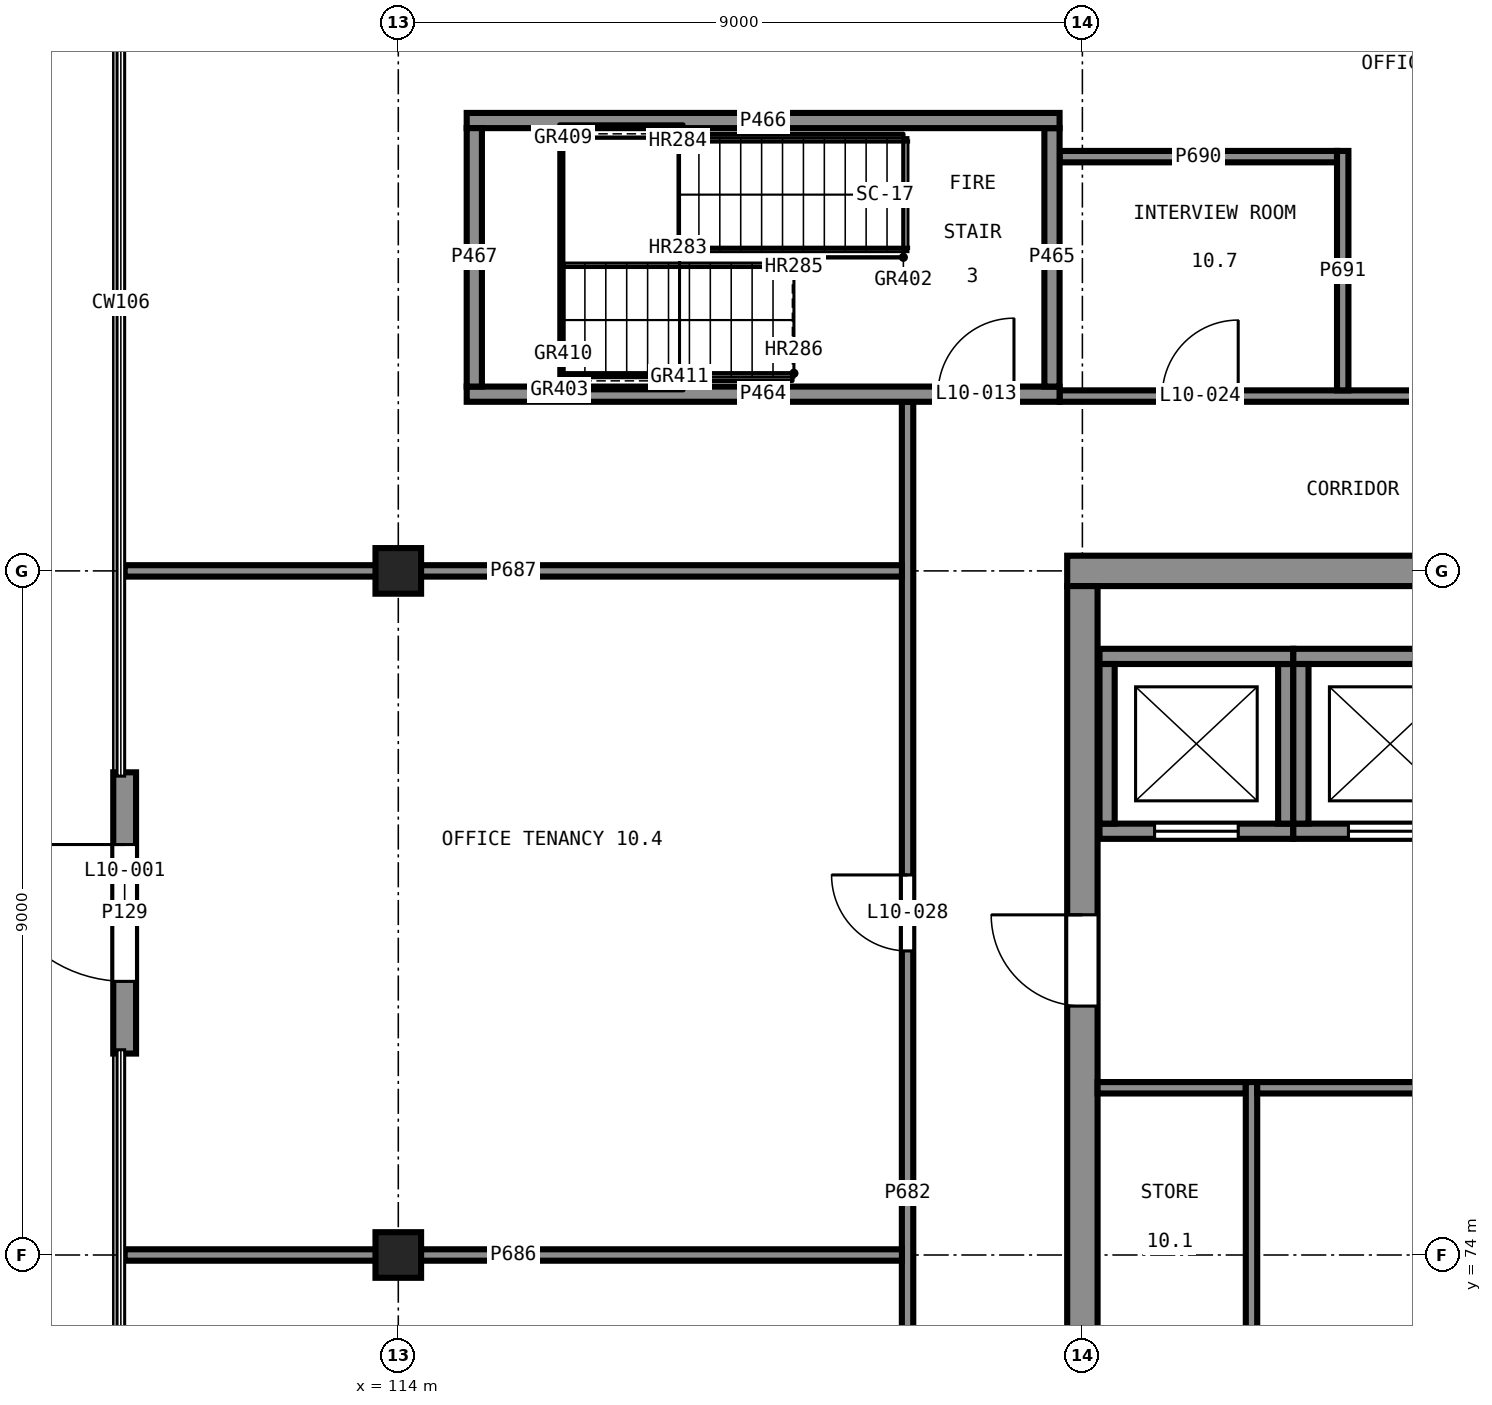
"""IFC4 building model, lengths in metres.
Left out: names, types, materials, properties, quantities, classifications, styles, units other than length and angle.
Written with IfcOpenShell. Run it as: python <this file> out.ifc"""

import sys

from ifc_helpers import new_model, si_unit, direction, frame, frame_2d, origin, origin_2d, place, context, subcontext, project, spatial, rectangle, extrude, element, fill, save


model = new_model("IFC4")
c1 = context("Model", 3, precision=1e-05, world=origin(), true_north=direction((0.0, 1.0)))
c2 = subcontext(c1, "Body", "Model", "MODEL_VIEW")
j1 = project(units=[si_unit("LENGTHUNIT", "METRE"), si_unit("PLANEANGLEUNIT", "RADIAN")], contexts=[c1])
p1 = place(None, origin())
s1 = spatial("IfcSite", under=j1, at=p1, CompositionType="ELEMENT")
p2 = place(p1, origin())
s2 = spatial("IfcBuilding", under=s1, at=p2, CompositionType="ELEMENT")
p3 = place(p2, frame((0.0, 0.0, 41.5)))
s3 = spatial("IfcBuildingStorey", under=s2, at=p3, CompositionType="ELEMENT", Elevation=41.5)
for number, where, z_axis, x_axis in (
    (1, (114.0, 74.0, 0.0), (0.0, 0.0, 1.0), (1.0, 0.0, 0.0)),
    (2, (114.0, 83.0, 0.0), (0.0, 0.0, 1.0), (1.0, 0.0, 0.0)),
):
    element("IfcColumn", number, at=place(p3, frame(where, z_axis=z_axis, x_axis=x_axis)), inside=s3, PredefinedType="COLUMN", context=c2, shape_type="SweptSolid", body=[
        extrude(rectangle(XDim=0.6, YDim=0.6, at=origin_2d()), origin(), (0.0, 0.0, 1.0), 4.0),
    ])
p4 = place(p3, frame((141.2, 83.0, 0.0), z_axis=(0.0, 0.0, 1.0), x_axis=(-1.0, 0.0, 0.0)))
e3 = element("IfcWall", 3, at=p4, inside=s3, PredefinedType="SHEAR", context=c2, shape_type="SweptSolid", body=[
    extrude(rectangle(XDim=18.4, YDim=0.4, at=frame_2d((9.2, 0.0))), origin(), (0.0, 0.0, 1.0), 4.0),
])
p5 = place(p3, frame((123.0, 82.8, 0.0), z_axis=(0.0, 0.0, 1.0), x_axis=(0.0, -1.0, 0.0)))
e4 = element("IfcWall", 4, at=p5, inside=s3, PredefinedType="SHEAR", context=c2, shape_type="SweptSolid", body=[
    extrude(rectangle(XDim=17.6, YDim=0.4, at=frame_2d((8.8, 0.0))), origin(), (0.0, 0.0, 1.0), 4.0),
])
p6 = place(p5, frame((12.075, 0.0, 0.0)))
e5 = element("IfcOpeningElement", 5, at=p6, cuts=e4, PredefinedType="OPENING", context=c2, shape_type="SweptSolid", body=[
    extrude(rectangle(XDim=1.2, YDim=2.1, at=frame_2d((0.6, 1.05))), frame((0.0, 0.21, 0.0), z_axis=(0.0, -1.0, 0.0), x_axis=(1.0, 0.0, 0.0)), (0.0, 0.0, 1.0), 0.42),
])
p7 = place(p5, frame((4.325, 0.0, 0.0)))
e6 = element("IfcOpeningElement", 6, at=p7, cuts=e4, PredefinedType="OPENING", context=c2, shape_type="SweptSolid", body=[
    extrude(rectangle(XDim=1.2, YDim=2.1, at=frame_2d((0.6, 1.05))), frame((0.0, 0.21, 0.0), z_axis=(0.0, -1.0, 0.0), x_axis=(1.0, 0.0, 0.0)), (0.0, 0.0, 1.0), 0.42),
])
p8 = place(p3, frame((110.4, 80.35, 0.0), z_axis=(0.0, 0.0, 1.0), x_axis=(0.0, -1.0, 0.0)))
e7 = element("IfcWall", 7, at=p8, inside=s3, PredefinedType="SOLIDWALL", context=c2, shape_type="SweptSolid", body=[
    extrude(rectangle(XDim=3.7, YDim=0.3, at=frame_2d((1.85, 0.0))), origin(), (0.0, 0.0, 1.0), 3.75),
])
p9 = place(p8, frame((0.95, 0.0, 0.0)))
e8 = element("IfcOpeningElement", 8, at=p9, cuts=e7, PredefinedType="OPENING", context=c2, shape_type="SweptSolid", body=[
    extrude(rectangle(XDim=1.8, YDim=2.4, at=frame_2d((0.9, 1.2))), frame((0.0, 0.16, 0.0), z_axis=(0.0, -1.0, 0.0), x_axis=(1.0, 0.0, 0.0)), (0.0, 0.0, 1.0), 0.32),
])
p10 = place(p3, frame((123.225, 79.575, 0.0), z_axis=(0.0, 0.0, 1.0), x_axis=(1.0, 0.0, 0.0)))
e9 = element("IfcWall", 9, at=p10, inside=s3, PredefinedType="SHEAR", context=c2, shape_type="SweptSolid", body=[
    extrude(rectangle(XDim=2.55, YDim=0.2, at=frame_2d((1.275, 0.0))), origin(), (0.0, 0.0, 1.0), 4.0),
])
p11 = place(p10, frame((0.725, 0.0, 0.0)))
e10 = element("IfcOpeningElement", 10, at=p11, cuts=e9, PredefinedType="OPENING", context=c2, shape_type="SweptSolid", body=[
    extrude(rectangle(XDim=1.1, YDim=2.1, at=frame_2d((0.55, 1.05))), frame((0.0, 0.11, 0.0), z_axis=(0.0, -1.0, 0.0), x_axis=(1.0, 0.0, 0.0)), (0.0, 0.0, 1.0), 0.22),
])
p12 = place(p3, frame((125.675, 79.675, 0.0), z_axis=(0.0, 0.0, 1.0), x_axis=(0.0, 1.0, 0.0)))
e11 = element("IfcWall", 11, at=p12, inside=s3, PredefinedType="SHEAR", context=c2, shape_type="SweptSolid", body=[
    extrude(rectangle(XDim=2.1, YDim=0.2, at=frame_2d((1.05, 0.0))), origin(), (0.0, 0.0, 1.0), 4.0),
])
p13 = place(p3, frame((125.775, 81.875, 0.0), z_axis=(0.0, 0.0, 1.0), x_axis=(-1.0, 0.0, 0.0)))
e12 = element("IfcWall", 12, at=p13, inside=s3, PredefinedType="SHEAR", context=c2, shape_type="SweptSolid", body=[
    extrude(rectangle(XDim=2.55, YDim=0.2, at=frame_2d((1.275, 0.0))), origin(), (0.0, 0.0, 1.0), 4.0),
])
p14 = place(p3, frame((123.325, 81.775, 0.0), z_axis=(0.0, 0.0, 1.0), x_axis=(0.0, -1.0, 0.0)))
e13 = element("IfcWall", 13, at=p14, inside=s3, PredefinedType="SHEAR", context=c2, shape_type="SweptSolid", body=[
    extrude(rectangle(XDim=2.1, YDim=0.2, at=frame_2d((1.05, 0.0))), origin(), (0.0, 0.0, 1.0), 4.0),
])
p15 = place(p3, frame((125.775, 79.575, 0.0), z_axis=(0.0, 0.0, 1.0), x_axis=(1.0, 0.0, 0.0)))
e14 = element("IfcWall", 14, at=p15, inside=s3, PredefinedType="SHEAR", context=c2, shape_type="SweptSolid", body=[
    extrude(rectangle(XDim=2.55, YDim=0.2, at=frame_2d((1.275, 0.0))), origin(), (0.0, 0.0, 1.0), 4.0),
])
p16 = place(p15, frame((0.725, 0.0, 0.0)))
e15 = element("IfcOpeningElement", 15, at=p16, cuts=e14, PredefinedType="OPENING", context=c2, shape_type="SweptSolid", body=[
    extrude(rectangle(XDim=1.1, YDim=2.1, at=frame_2d((0.55, 1.05))), frame((0.0, 0.11, 0.0), z_axis=(0.0, -1.0, 0.0), x_axis=(1.0, 0.0, 0.0)), (0.0, 0.0, 1.0), 0.22),
])
p17 = place(p3, frame((128.325, 81.875, 0.0), z_axis=(0.0, 0.0, 1.0), x_axis=(-1.0, 0.0, 0.0)))
e16 = element("IfcWall", 16, at=p17, inside=s3, PredefinedType="SHEAR", context=c2, shape_type="SweptSolid", body=[
    extrude(rectangle(XDim=2.55, YDim=0.2, at=frame_2d((1.275, 0.0))), origin(), (0.0, 0.0, 1.0), 4.0),
])
p18 = place(p3, frame((125.875, 81.775, 0.0), z_axis=(0.0, 0.0, 1.0), x_axis=(0.0, -1.0, 0.0)))
e17 = element("IfcWall", 17, at=p18, inside=s3, PredefinedType="SHEAR", context=c2, shape_type="SweptSolid", body=[
    extrude(rectangle(XDim=2.1, YDim=0.2, at=frame_2d((1.05, 0.0))), origin(), (0.0, 0.0, 1.0), 4.0),
])
p19 = place(p3, frame((114.9, 85.325, 0.0), z_axis=(0.0, 0.0, 1.0), x_axis=(1.0, 0.0, 0.0)))
e18 = element("IfcWall", 18, at=p19, inside=s3, PredefinedType="SHEAR", context=c2, shape_type="SweptSolid", body=[
    extrude(rectangle(XDim=7.8, YDim=0.2, at=frame_2d((3.9, 0.0))), origin(), (0.0, 0.0, 1.0), 3.75),
])
p20 = place(p19, frame((6.2, 0.0, 0.0)))
e19 = element("IfcOpeningElement", 19, at=p20, cuts=e18, PredefinedType="OPENING", context=c2, shape_type="SweptSolid", body=[
    extrude(rectangle(XDim=1.0, YDim=2.1, at=frame_2d((0.5, 1.05))), frame((0.0, 0.11, 0.0), z_axis=(0.0, -1.0, 0.0), x_axis=(1.0, 0.0, 0.0)), (0.0, 0.0, 1.0), 0.22),
])
p21 = place(p3, frame((122.6, 85.425, 0.0), z_axis=(0.0, 0.0, 1.0), x_axis=(0.0, 1.0, 0.0)))
e20 = element("IfcWall", 20, at=p21, inside=s3, PredefinedType="SHEAR", context=c2, shape_type="SweptSolid", body=[
    extrude(rectangle(XDim=3.4, YDim=0.2, at=frame_2d((1.7, 0.0))), origin(), (0.0, 0.0, 1.0), 3.75),
])
p22 = place(p3, frame((122.7, 88.925, 0.0), z_axis=(0.0, 0.0, 1.0), x_axis=(-1.0, 0.0, 0.0)))
e21 = element("IfcWall", 21, at=p22, inside=s3, PredefinedType="SHEAR", context=c2, shape_type="SweptSolid", body=[
    extrude(rectangle(XDim=7.8, YDim=0.2, at=frame_2d((3.9, 0.0))), origin(), (0.0, 0.0, 1.0), 3.75),
])
p23 = place(p3, frame((115.0, 88.825, 0.0), z_axis=(0.0, 0.0, 1.0), x_axis=(0.0, -1.0, 0.0)))
e22 = element("IfcWall", 22, at=p23, inside=s3, PredefinedType="SHEAR", context=c2, shape_type="SweptSolid", body=[
    extrude(rectangle(XDim=3.4, YDim=0.2, at=frame_2d((1.7, 0.0))), origin(), (0.0, 0.0, 1.0), 3.75),
])
p24 = place(p3, frame((125.225, 71.725, 0.0), z_axis=(0.0, 0.0, 1.0), x_axis=(0.0, 1.0, 0.0)))
e23 = element("IfcWall", 23, at=p24, inside=s3, PredefinedType="PARTITIONING", context=c2, shape_type="SweptSolid", body=[
    extrude(rectangle(XDim=4.55, YDim=0.15, at=frame_2d((2.275, 0.0))), origin(), (0.0, 0.0, 1.0), 3.75),
])
p25 = place(p3, frame((123.2, 76.2, 0.0), z_axis=(0.0, 0.0, 1.0), x_axis=(1.0, 0.0, 0.0)))
e24 = element("IfcWall", 24, at=p25, inside=s3, PredefinedType="PARTITIONING", context=c2, shape_type="SweptSolid", body=[
    extrude(rectangle(XDim=1.95, YDim=0.15, at=frame_2d((0.975, 0.0))), origin(), (0.0, 0.0, 1.0), 3.75),
])
p26 = place(p3, frame((125.3, 76.2, 0.0), z_axis=(0.0, 0.0, 1.0), x_axis=(1.0, 0.0, 0.0)))
e25 = element("IfcWall", 25, at=p26, inside=s3, PredefinedType="PARTITIONING", context=c2, shape_type="SweptSolid", body=[
    extrude(rectangle(XDim=5.35, YDim=0.15, at=frame_2d((2.675, 0.0))), origin(), (0.0, 0.0, 1.0), 3.75),
])
p27 = place(p26, frame((2.225, 0.0, 0.0)))
e26 = element("IfcOpeningElement", 26, at=p27, cuts=e25, PredefinedType="OPENING", context=c2, shape_type="SweptSolid", body=[
    extrude(rectangle(XDim=0.9, YDim=2.1, at=frame_2d((0.45, 1.05))), frame((0.0, 0.085, 0.0), z_axis=(0.0, -1.0, 0.0), x_axis=(1.0, 0.0, 0.0)), (0.0, 0.0, 1.0), 0.17),
])
p28 = place(p3, frame((120.7, 64.4, 0.0), z_axis=(0.0, 0.0, 1.0), x_axis=(0.0, 1.0, 0.0)))
e27 = element("IfcWall", 27, at=p28, inside=s3, PredefinedType="PARTITIONING", context=c2, shape_type="SweptSolid", body=[
    extrude(rectangle(XDim=20.825, YDim=0.15, at=frame_2d((10.413, 0.0))), origin(), (0.0, 0.0, 1.0), 3.75),
])
p29 = place(p28, frame((4.413, 0.0, 0.0)))
e28 = element("IfcOpeningElement", 28, at=p29, cuts=e27, PredefinedType="OPENING", context=c2, shape_type="SweptSolid", body=[
    extrude(rectangle(XDim=1.0, YDim=2.1, at=frame_2d((0.5, 1.05))), frame((0.0, 0.085, 0.0), z_axis=(0.0, -1.0, 0.0), x_axis=(1.0, 0.0, 0.0)), (0.0, 0.0, 1.0), 0.17),
])
p30 = place(p28, frame((13.6, 0.0, 0.0)))
e29 = element("IfcOpeningElement", 29, at=p30, cuts=e27, PredefinedType="OPENING", context=c2, shape_type="SweptSolid", body=[
    extrude(rectangle(XDim=1.0, YDim=2.1, at=frame_2d((0.5, 1.05))), frame((0.0, 0.085, 0.0), z_axis=(0.0, -1.0, 0.0), x_axis=(1.0, 0.0, 0.0)), (0.0, 0.0, 1.0), 0.17),
])
p31 = place(p3, frame((122.7, 85.3, 0.0), z_axis=(0.0, 0.0, 1.0), x_axis=(1.0, 0.0, 0.0)))
e30 = element("IfcWall", 30, at=p31, inside=s3, PredefinedType="PARTITIONING", context=c2, shape_type="SweptSolid", body=[
    extrude(rectangle(XDim=9.9, YDim=0.15, at=frame_2d((4.95, 0.0))), origin(), (0.0, 0.0, 1.0), 3.75),
])
p32 = place(p31, frame((1.35, 0.0, 0.0)))
e31 = element("IfcOpeningElement", 31, at=p32, cuts=e30, PredefinedType="OPENING", context=c2, shape_type="SweptSolid", body=[
    extrude(rectangle(XDim=1.0, YDim=2.1, at=frame_2d((0.5, 1.05))), frame((0.0, 0.085, 0.0), z_axis=(0.0, -1.0, 0.0), x_axis=(1.0, 0.0, 0.0)), (0.0, 0.0, 1.0), 0.17),
])
p33 = place(p31, frame((6.335, 0.0, 0.0)))
e32 = element("IfcOpeningElement", 32, at=p33, cuts=e30, PredefinedType="OPENING", context=c2, shape_type="SweptSolid", body=[
    extrude(rectangle(XDim=1.0, YDim=2.1, at=frame_2d((0.5, 1.05))), frame((0.0, 0.085, 0.0), z_axis=(0.0, -1.0, 0.0), x_axis=(1.0, 0.0, 0.0)), (0.0, 0.0, 1.0), 0.17),
])
for number, where, z_axis, x_axis in (
    (33, (110.4, 74.0, 0.0), (0.0, 0.0, 1.0), (1.0, 0.0, 0.0)),
    (34, (110.4, 83.0, 0.0), (0.0, 0.0, 1.0), (1.0, 0.0, 0.0)),
):
    element("IfcWall", number, at=place(p3, frame(where, z_axis=z_axis, x_axis=x_axis)), inside=s3, PredefinedType="PARTITIONING", context=c2, shape_type="SweptSolid", body=[
        extrude(rectangle(XDim=10.226, YDim=0.15, at=frame_2d((5.113, 0.0))), origin(), (0.0, 0.0, 1.0), 2.85),
    ])
p34 = place(p3, frame((122.7, 88.45, 0.0), z_axis=(0.0, 0.0, 1.0), x_axis=(1.0, 0.0, 0.0)))
e35 = element("IfcWall", 35, at=p34, inside=s3, PredefinedType="PARTITIONING", context=c2, shape_type="SweptSolid", body=[
    extrude(rectangle(XDim=3.65, YDim=0.15, at=frame_2d((1.825, 0.0))), origin(), (0.0, 0.0, 1.0), 3.75),
])
p35 = place(p3, frame((126.425, 85.375, 0.0), z_axis=(0.0, 0.0, 1.0), x_axis=(0.0, 1.0, 0.0)))
e36 = element("IfcWall", 36, at=p35, inside=s3, PredefinedType="PARTITIONING", context=c2, shape_type="SweptSolid", body=[
    extrude(rectangle(XDim=3.15, YDim=0.15, at=frame_2d((1.575, 0.0))), origin(), (0.0, 0.0, 1.0), 3.75),
])
p36 = place(p9, frame((1.8, 0.0, 0.0), z_axis=(0.0, 0.0, 1.0), x_axis=(-1.0, 0.0, 0.0)))
e37 = element("IfcDoor", 37, at=p36, inside=s3, OperationType="DOUBLE_DOOR_SINGLE_SWING", PredefinedType="DOOR", context=c2, shape_type="SweptSolid", body=[
    extrude(rectangle(XDim=1.8, YDim=2.4, at=frame_2d((0.9, 1.2))), frame((0.0, 0.025, 0.0), z_axis=(0.0, -1.0, 0.0), x_axis=(1.0, 0.0, 0.0)), (0.0, 0.0, 1.0), 0.05),
])
fill(e8, e37)
p37 = place(p11, origin())
e38 = element("IfcDoor", 38, at=p37, inside=s3, OperationType="SLIDING_TO_LEFT", PredefinedType="DOOR", context=c2, shape_type="SweptSolid", body=[
    extrude(rectangle(XDim=1.1, YDim=2.1, at=frame_2d((0.55, 1.05))), frame((0.0, 0.025, 0.0), z_axis=(0.0, -1.0, 0.0), x_axis=(1.0, 0.0, 0.0)), (0.0, 0.0, 1.0), 0.05),
])
fill(e10, e38)
p38 = place(p16, origin())
e39 = element("IfcDoor", 39, at=p38, inside=s3, OperationType="SLIDING_TO_LEFT", PredefinedType="DOOR", context=c2, shape_type="SweptSolid", body=[
    extrude(rectangle(XDim=1.1, YDim=2.1, at=frame_2d((0.55, 1.05))), frame((0.0, 0.025, 0.0), z_axis=(0.0, -1.0, 0.0), x_axis=(1.0, 0.0, 0.0)), (0.0, 0.0, 1.0), 0.05),
])
fill(e15, e39)
p39 = place(p20, origin())
e40 = element("IfcDoor", 40, at=p39, inside=s3, OperationType="SINGLE_SWING_LEFT", PredefinedType="DOOR", context=c2, shape_type="SweptSolid", body=[
    extrude(rectangle(XDim=1.0, YDim=2.1, at=frame_2d((0.5, 1.05))), frame((0.0, 0.025, 0.0), z_axis=(0.0, -1.0, 0.0), x_axis=(1.0, 0.0, 0.0)), (0.0, 0.0, 1.0), 0.05),
])
fill(e19, e40)
p40 = place(p7, frame((1.2, 0.0, 0.0), z_axis=(0.0, 0.0, 1.0), x_axis=(-1.0, 0.0, 0.0)))
e41 = element("IfcDoor", 41, at=p40, inside=s3, OperationType="SINGLE_SWING_LEFT", PredefinedType="DOOR", context=c2, shape_type="SweptSolid", body=[
    extrude(rectangle(XDim=1.2, YDim=2.1, at=frame_2d((0.6, 1.05))), frame((0.0, 0.025, 0.0), z_axis=(0.0, -1.0, 0.0), x_axis=(1.0, 0.0, 0.0)), (0.0, 0.0, 1.0), 0.05),
])
fill(e6, e41)
p41 = place(p32, origin())
e42 = element("IfcDoor", 42, at=p41, inside=s3, OperationType="SINGLE_SWING_LEFT", PredefinedType="DOOR", context=c2, shape_type="SweptSolid", body=[
    extrude(rectangle(XDim=1.0, YDim=2.1, at=frame_2d((0.5, 1.05))), frame((0.0, 0.025, 0.0), z_axis=(0.0, -1.0, 0.0), x_axis=(1.0, 0.0, 0.0)), (0.0, 0.0, 1.0), 0.05),
])
fill(e31, e42)
p42 = place(p30, origin())
e43 = element("IfcDoor", 43, at=p42, inside=s3, OperationType="SINGLE_SWING_LEFT", PredefinedType="DOOR", context=c2, shape_type="SweptSolid", body=[
    extrude(rectangle(XDim=1.0, YDim=2.1, at=frame_2d((0.5, 1.05))), frame((0.0, 0.025, 0.0), z_axis=(0.0, -1.0, 0.0), x_axis=(1.0, 0.0, 0.0)), (0.0, 0.0, 1.0), 0.05),
])
fill(e29, e43)
save(model, sys.argv[1])
